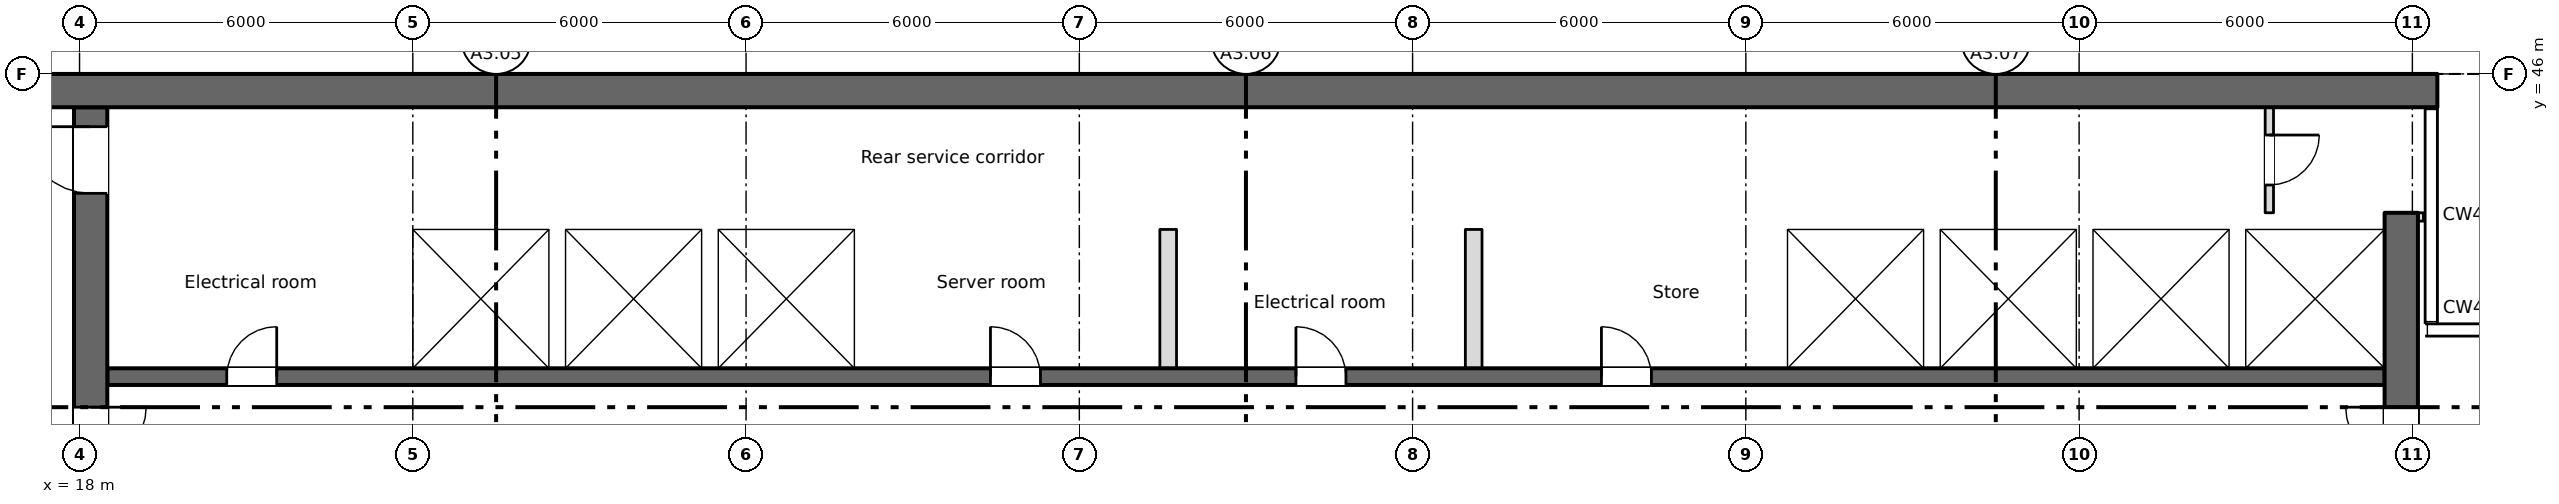
"""IFC4 building model, lengths in metres.
Left out: names, types, materials, properties, quantities, classifications, styles, units other than length and angle.
Written with IfcOpenShell. Run it as: python <this file> out.ifc"""

import sys

from ifc_helpers import new_model, si_unit, direction, frame, frame_2d, origin, place, context, subcontext, project, spatial, rectangle, extrude, element, fill, save


model = new_model("IFC4")
c1 = context("Model", 3, precision=1e-05, world=origin(), true_north=direction((0.0, 1.0)))
c2 = subcontext(c1, "Body", "Model", "MODEL_VIEW")
j1 = project(units=[si_unit("LENGTHUNIT", "METRE"), si_unit("PLANEANGLEUNIT", "RADIAN")], contexts=[c1])
p1 = place(None, origin())
s1 = spatial("IfcSite", under=j1, at=p1, CompositionType="ELEMENT")
p2 = place(p1, origin())
s2 = spatial("IfcBuilding", under=s1, at=p2, CompositionType="ELEMENT")
p3 = place(p2, frame((0.0, 0.0, 262.15)))
s3 = spatial("IfcBuildingStorey", under=s2, at=p3, CompositionType="ELEMENT", Elevation=262.15)
p4 = place(p3, frame((11.55, 45.7, 0.0), z_axis=(0.0, 0.0, 1.0), x_axis=(1.0, 0.0, 0.0)))
e1 = element("IfcWall", 1, at=p4, inside=s3, PredefinedType="SHEAR", context=c2, shape_type="SweptSolid", body=[
    extrude(rectangle(XDim=48.9, YDim=0.6, at=frame_2d((24.45, 0.0))), origin(), (0.0, 0.0, 1.0), 3.2),
])
p5 = place(p4, frame((1.2, 0.0, 0.6)))
e2 = element("IfcOpeningElement", 2, at=p5, cuts=e1, PredefinedType="OPENING", context=c2, shape_type="SweptSolid", body=[
    extrude(rectangle(XDim=0.6, YDim=2.4, at=frame_2d((0.3, 1.2))), frame((0.0, 0.31, 0.0), z_axis=(0.0, -1.0, 0.0), x_axis=(1.0, 0.0, 0.0)), (0.0, 0.0, 1.0), 0.62),
])
p6 = place(p3, frame((18.2, 28.4, 0.0), z_axis=(0.0, 0.0, 1.0), x_axis=(0.0, 1.0, 0.0)))
e3 = element("IfcWall", 3, at=p6, inside=s3, PredefinedType="SHEAR", context=c2, shape_type="SweptSolid", body=[
    extrude(rectangle(XDim=17.0, YDim=0.6, at=frame_2d((8.5, 0.0))), origin(), (0.0, 0.0, 1.0), 3.2),
])
p7 = place(p6, frame((9.6, 0.0, 0.0)))
e4 = element("IfcOpeningElement", 4, at=p7, cuts=e3, PredefinedType="OPENING", context=c2, shape_type="SweptSolid", body=[
    extrude(rectangle(XDim=2.0, YDim=2.1, at=frame_2d((1.0, 1.05))), frame((0.0, 0.31, 0.0), z_axis=(0.0, -1.0, 0.0), x_axis=(1.0, 0.0, 0.0)), (0.0, 0.0, 1.0), 0.62),
])
p8 = place(p6, frame((15.45, 0.0, 0.0)))
e5 = element("IfcOpeningElement", 5, at=p8, cuts=e3, PredefinedType="OPENING", context=c2, shape_type="SweptSolid", body=[
    extrude(rectangle(XDim=1.2, YDim=2.1, at=frame_2d((0.6, 1.05))), frame((0.0, 0.31, 0.0), z_axis=(0.0, -1.0, 0.0), x_axis=(1.0, 0.0, 0.0)), (0.0, 0.0, 1.0), 0.62),
])
p9 = place(p3, frame((59.8, 28.4, 0.0), z_axis=(0.0, 0.0, 1.0), x_axis=(0.0, 1.0, 0.0)))
e6 = element("IfcWall", 6, at=p9, inside=s3, PredefinedType="SHEAR", context=c2, shape_type="SweptSolid", body=[
    extrude(rectangle(XDim=15.1, YDim=0.6, at=frame_2d((7.55, 0.0))), origin(), (0.0, 0.0, 1.0), 3.2),
])
p10 = place(p9, frame((9.6, 0.0, 0.0)))
e7 = element("IfcOpeningElement", 7, at=p10, cuts=e6, PredefinedType="OPENING", context=c2, shape_type="SweptSolid", body=[
    extrude(rectangle(XDim=2.0, YDim=2.1, at=frame_2d((1.0, 1.05))), frame((0.0, 0.31, 0.0), z_axis=(0.0, -1.0, 0.0), x_axis=(1.0, 0.0, 0.0)), (0.0, 0.0, 1.0), 0.62),
])
p11 = place(p3, frame((18.5, 40.55, 0.0), z_axis=(0.0, 0.0, 1.0), x_axis=(1.0, 0.0, 0.0)))
e8 = element("IfcWall", 8, at=p11, inside=s3, PredefinedType="SHEAR", context=c2, shape_type="SweptSolid", body=[
    extrude(rectangle(XDim=41.0, YDim=0.3, at=frame_2d((20.5, 0.0))), origin(), (0.0, 0.0, 1.0), 3.2),
])
p12 = place(p11, frame((2.15, 0.0, 0.0)))
e9 = element("IfcOpeningElement", 9, at=p12, cuts=e8, PredefinedType="OPENING", context=c2, shape_type="SweptSolid", body=[
    extrude(rectangle(XDim=0.9, YDim=2.1, at=frame_2d((0.45, 1.05))), frame((0.0, 0.16, 0.0), z_axis=(0.0, -1.0, 0.0), x_axis=(1.0, 0.0, 0.0)), (0.0, 0.0, 1.0), 0.32),
])
p13 = place(p11, frame((15.9, 0.0, 0.0)))
e10 = element("IfcOpeningElement", 10, at=p13, cuts=e8, PredefinedType="OPENING", context=c2, shape_type="SweptSolid", body=[
    extrude(rectangle(XDim=0.9, YDim=2.1, at=frame_2d((0.45, 1.05))), frame((0.0, 0.16, 0.0), z_axis=(0.0, -1.0, 0.0), x_axis=(1.0, 0.0, 0.0)), (0.0, 0.0, 1.0), 0.32),
])
p14 = place(p11, frame((21.4, 0.0, 0.0)))
e11 = element("IfcOpeningElement", 11, at=p14, cuts=e8, PredefinedType="OPENING", context=c2, shape_type="SweptSolid", body=[
    extrude(rectangle(XDim=0.9, YDim=2.1, at=frame_2d((0.45, 1.05))), frame((0.0, 0.16, 0.0), z_axis=(0.0, -1.0, 0.0), x_axis=(1.0, 0.0, 0.0)), (0.0, 0.0, 1.0), 0.32),
])
p15 = place(p11, frame((26.9, 0.0, 0.0)))
e12 = element("IfcOpeningElement", 12, at=p15, cuts=e8, PredefinedType="OPENING", context=c2, shape_type="SweptSolid", body=[
    extrude(rectangle(XDim=0.9, YDim=2.1, at=frame_2d((0.45, 1.05))), frame((0.0, 0.16, 0.0), z_axis=(0.0, -1.0, 0.0), x_axis=(1.0, 0.0, 0.0)), (0.0, 0.0, 1.0), 0.32),
])
p16 = place(p11, frame((6.175, 0.0, 0.0)))
e13 = element("IfcOpeningElement", 13, at=p16, cuts=e8, PredefinedType="OPENING", context=c2, shape_type="SweptSolid", body=[
    extrude(rectangle(XDim=1.1, YDim=2.1, at=frame_2d((0.55, 1.05))), frame((0.0, 0.16, 0.0), z_axis=(0.0, -1.0, 0.0), x_axis=(1.0, 0.0, 0.0)), (0.0, 0.0, 1.0), 0.32),
])
p17 = place(p11, frame((8.925, 0.0, 0.0)))
e14 = element("IfcOpeningElement", 14, at=p17, cuts=e8, PredefinedType="OPENING", context=c2, shape_type="SweptSolid", body=[
    extrude(rectangle(XDim=1.1, YDim=2.1, at=frame_2d((0.55, 1.05))), frame((0.0, 0.16, 0.0), z_axis=(0.0, -1.0, 0.0), x_axis=(1.0, 0.0, 0.0)), (0.0, 0.0, 1.0), 0.32),
])
p18 = place(p11, frame((11.675, 0.0, 0.0)))
e15 = element("IfcOpeningElement", 15, at=p18, cuts=e8, PredefinedType="OPENING", context=c2, shape_type="SweptSolid", body=[
    extrude(rectangle(XDim=1.1, YDim=2.1, at=frame_2d((0.55, 1.05))), frame((0.0, 0.16, 0.0), z_axis=(0.0, -1.0, 0.0), x_axis=(1.0, 0.0, 0.0)), (0.0, 0.0, 1.0), 0.32),
])
p19 = place(p11, frame((30.925, 0.0, 0.0)))
e16 = element("IfcOpeningElement", 16, at=p19, cuts=e8, PredefinedType="OPENING", context=c2, shape_type="SweptSolid", body=[
    extrude(rectangle(XDim=1.1, YDim=2.1, at=frame_2d((0.55, 1.05))), frame((0.0, 0.16, 0.0), z_axis=(0.0, -1.0, 0.0), x_axis=(1.0, 0.0, 0.0)), (0.0, 0.0, 1.0), 0.32),
])
p20 = place(p11, frame((33.675, 0.0, 0.0)))
e17 = element("IfcOpeningElement", 17, at=p20, cuts=e8, PredefinedType="OPENING", context=c2, shape_type="SweptSolid", body=[
    extrude(rectangle(XDim=1.1, YDim=2.1, at=frame_2d((0.55, 1.05))), frame((0.0, 0.16, 0.0), z_axis=(0.0, -1.0, 0.0), x_axis=(1.0, 0.0, 0.0)), (0.0, 0.0, 1.0), 0.32),
])
p21 = place(p11, frame((36.375, 0.0, 0.0)))
e18 = element("IfcOpeningElement", 18, at=p21, cuts=e8, PredefinedType="OPENING", context=c2, shape_type="SweptSolid", body=[
    extrude(rectangle(XDim=1.2, YDim=2.1, at=frame_2d((0.6, 1.05))), frame((0.0, 0.16, 0.0), z_axis=(0.0, -1.0, 0.0), x_axis=(1.0, 0.0, 0.0)), (0.0, 0.0, 1.0), 0.32),
])
p22 = place(p11, frame((39.15, 0.0, 0.0)))
e19 = element("IfcOpeningElement", 19, at=p22, cuts=e8, PredefinedType="OPENING", context=c2, shape_type="SweptSolid", body=[
    extrude(rectangle(XDim=1.2, YDim=2.1, at=frame_2d((0.6, 1.05))), frame((0.0, 0.16, 0.0), z_axis=(0.0, -1.0, 0.0), x_axis=(1.0, 0.0, 0.0)), (0.0, 0.0, 1.0), 0.32),
])
p23 = place(p3, frame((18.5, 43.35, 0.0), z_axis=(0.0, 0.0, 1.0), x_axis=(1.0, 0.0, 0.0)))
e20 = element("IfcWall", 20, at=p23, inside=s3, PredefinedType="SHEAR", context=c2, shape_type="SweptSolid", body=[
    extrude(rectangle(XDim=41.0, YDim=0.3, at=frame_2d((20.5, 0.0))), origin(), (0.0, 0.0, 1.0), 3.2),
])
for number, where, z_axis, x_axis in (
    (21, (23.85, 40.7, 0.0), (0.0, 0.0, 1.0), (0.0, 1.0, 0.0)),
    (22, (26.6, 40.7, 0.0), (0.0, 0.0, 1.0), (0.0, 1.0, 0.0)),
    (23, (29.35, 40.7, 0.0), (0.0, 0.0, 1.0), (0.0, 1.0, 0.0)),
    (24, (32.1, 40.7, 0.0), (0.0, 0.0, 1.0), (0.0, 1.0, 0.0)),
    (25, (48.6, 40.7, 0.0), (0.0, 0.0, 1.0), (0.0, 1.0, 0.0)),
    (26, (51.35, 40.7, 0.0), (0.0, 0.0, 1.0), (0.0, 1.0, 0.0)),
    (27, (54.1, 40.7, 0.0), (0.0, 0.0, 1.0), (0.0, 1.0, 0.0)),
    (28, (56.85, 40.7, 0.0), (0.0, 0.0, 1.0), (0.0, 1.0, 0.0)),
):
    element("IfcWall", number, at=place(p3, frame(where, z_axis=z_axis, x_axis=x_axis)), inside=s3, PredefinedType="SHEAR", context=c2, shape_type="SweptSolid", body=[
        extrude(rectangle(XDim=2.5, YDim=0.3, at=frame_2d((1.25, 0.0))), origin(), (0.0, 0.0, 1.0), 3.2),
    ])
p24 = place(p3, frame((57.425, 45.4, 0.0), z_axis=(0.0, 0.0, 1.0), x_axis=(0.0, -1.0, 0.0)))
e29 = element("IfcWall", 29, at=p24, inside=s3, PredefinedType="PARTITIONING", context=c2, shape_type="SweptSolid", body=[
    extrude(rectangle(XDim=1.9, YDim=0.15, at=frame_2d((0.95, 0.0))), origin(), (0.0, 0.0, 1.0), 3.2),
])
p25 = place(p24, frame((0.5, 0.0, 0.0)))
e30 = element("IfcOpeningElement", 30, at=p25, cuts=e29, PredefinedType="OPENING", context=c2, shape_type="SweptSolid", body=[
    extrude(rectangle(XDim=0.9, YDim=2.1, at=frame_2d((0.45, 1.05))), frame((0.0, 0.085, 0.0), z_axis=(0.0, -1.0, 0.0), x_axis=(1.0, 0.0, 0.0)), (0.0, 0.0, 1.0), 0.17),
])
p26 = place(p3, frame((60.15, 43.35, 0.0), z_axis=(0.0, 0.0, 1.0), x_axis=(0.0, 1.0, 0.0)))
e31 = element("IfcWall", 31, at=p26, inside=s3, PredefinedType="PARTITIONING", context=c2, shape_type="SweptSolid", body=[
    extrude(rectangle(XDim=0.15, YDim=0.1, at=frame_2d((0.075, 0.0))), origin(), (0.0, 0.0, 1.0), 3.2),
])
for number, where, z_axis, x_axis in (
    (32, (37.6, 40.7, 0.0), (0.0, 0.0, 1.0), (0.0, 1.0, 0.0)),
    (33, (43.1, 40.7, 0.0), (0.0, 0.0, 1.0), (0.0, 1.0, 0.0)),
):
    element("IfcWall", number, at=place(p3, frame(where, z_axis=z_axis, x_axis=x_axis)), inside=s3, PredefinedType="PARTITIONING", context=c2, shape_type="SweptSolid", body=[
        extrude(rectangle(XDim=2.5, YDim=0.3, at=frame_2d((1.25, 0.0))), origin(), (0.0, 0.0, 1.0), 3.2),
    ])
p27 = place(p25, origin())
e34 = element("IfcDoor", 34, at=p27, inside=s3, OperationType="SINGLE_SWING_LEFT", PredefinedType="DOOR", context=c2, shape_type="SweptSolid", body=[
    extrude(rectangle(XDim=0.9, YDim=2.1, at=frame_2d((0.45, 1.05))), frame((0.0, 0.025, 0.0), z_axis=(0.0, -1.0, 0.0), x_axis=(1.0, 0.0, 0.0)), (0.0, 0.0, 1.0), 0.05),
])
fill(e30, e34)
p28 = place(p12, origin())
e35 = element("IfcDoor", 35, at=p28, inside=s3, OperationType="SINGLE_SWING_RIGHT", PredefinedType="DOOR", context=c2, shape_type="SweptSolid", body=[
    extrude(rectangle(XDim=0.9, YDim=2.1, at=frame_2d((0.45, 1.05))), frame((0.0, 0.025, 0.0), z_axis=(0.0, -1.0, 0.0), x_axis=(1.0, 0.0, 0.0)), (0.0, 0.0, 1.0), 0.05),
])
fill(e9, e35)
p29 = place(p13, origin())
e36 = element("IfcDoor", 36, at=p29, inside=s3, OperationType="SINGLE_SWING_LEFT", PredefinedType="DOOR", context=c2, shape_type="SweptSolid", body=[
    extrude(rectangle(XDim=0.9, YDim=2.1, at=frame_2d((0.45, 1.05))), frame((0.0, 0.025, 0.0), z_axis=(0.0, -1.0, 0.0), x_axis=(1.0, 0.0, 0.0)), (0.0, 0.0, 1.0), 0.05),
])
fill(e10, e36)
p30 = place(p14, origin())
e37 = element("IfcDoor", 37, at=p30, inside=s3, OperationType="SINGLE_SWING_LEFT", PredefinedType="DOOR", context=c2, shape_type="SweptSolid", body=[
    extrude(rectangle(XDim=0.9, YDim=2.1, at=frame_2d((0.45, 1.05))), frame((0.0, 0.025, 0.0), z_axis=(0.0, -1.0, 0.0), x_axis=(1.0, 0.0, 0.0)), (0.0, 0.0, 1.0), 0.05),
])
fill(e11, e37)
p31 = place(p15, origin())
e38 = element("IfcDoor", 38, at=p31, inside=s3, OperationType="SINGLE_SWING_LEFT", PredefinedType="DOOR", context=c2, shape_type="SweptSolid", body=[
    extrude(rectangle(XDim=0.9, YDim=2.1, at=frame_2d((0.45, 1.05))), frame((0.0, 0.025, 0.0), z_axis=(0.0, -1.0, 0.0), x_axis=(1.0, 0.0, 0.0)), (0.0, 0.0, 1.0), 0.05),
])
fill(e12, e38)
p32 = place(p16, origin())
e39 = element("IfcDoor", 39, at=p32, inside=s3, OperationType="SLIDING_TO_LEFT", PredefinedType="DOOR", context=c2, shape_type="SweptSolid", body=[
    extrude(rectangle(XDim=1.1, YDim=2.1, at=frame_2d((0.55, 1.05))), frame((0.0, 0.025, 0.0), z_axis=(0.0, -1.0, 0.0), x_axis=(1.0, 0.0, 0.0)), (0.0, 0.0, 1.0), 0.05),
])
fill(e13, e39)
p33 = place(p17, origin())
e40 = element("IfcDoor", 40, at=p33, inside=s3, OperationType="SLIDING_TO_LEFT", PredefinedType="DOOR", context=c2, shape_type="SweptSolid", body=[
    extrude(rectangle(XDim=1.1, YDim=2.1, at=frame_2d((0.55, 1.05))), frame((0.0, 0.025, 0.0), z_axis=(0.0, -1.0, 0.0), x_axis=(1.0, 0.0, 0.0)), (0.0, 0.0, 1.0), 0.05),
])
fill(e14, e40)
p34 = place(p18, origin())
e41 = element("IfcDoor", 41, at=p34, inside=s3, OperationType="SLIDING_TO_LEFT", PredefinedType="DOOR", context=c2, shape_type="SweptSolid", body=[
    extrude(rectangle(XDim=1.1, YDim=2.1, at=frame_2d((0.55, 1.05))), frame((0.0, 0.025, 0.0), z_axis=(0.0, -1.0, 0.0), x_axis=(1.0, 0.0, 0.0)), (0.0, 0.0, 1.0), 0.05),
])
fill(e15, e41)
p35 = place(p19, origin())
e42 = element("IfcDoor", 42, at=p35, inside=s3, OperationType="SLIDING_TO_LEFT", PredefinedType="DOOR", context=c2, shape_type="SweptSolid", body=[
    extrude(rectangle(XDim=1.1, YDim=2.1, at=frame_2d((0.55, 1.05))), frame((0.0, 0.025, 0.0), z_axis=(0.0, -1.0, 0.0), x_axis=(1.0, 0.0, 0.0)), (0.0, 0.0, 1.0), 0.05),
])
fill(e16, e42)
p36 = place(p20, origin())
e43 = element("IfcDoor", 43, at=p36, inside=s3, OperationType="SLIDING_TO_LEFT", PredefinedType="DOOR", context=c2, shape_type="SweptSolid", body=[
    extrude(rectangle(XDim=1.1, YDim=2.1, at=frame_2d((0.55, 1.05))), frame((0.0, 0.025, 0.0), z_axis=(0.0, -1.0, 0.0), x_axis=(1.0, 0.0, 0.0)), (0.0, 0.0, 1.0), 0.05),
])
fill(e17, e43)
p37 = place(p21, origin())
e44 = element("IfcDoor", 44, at=p37, inside=s3, OperationType="SLIDING_TO_LEFT", PredefinedType="DOOR", context=c2, shape_type="SweptSolid", body=[
    extrude(rectangle(XDim=1.2, YDim=2.1, at=frame_2d((0.6, 1.05))), frame((0.0, 0.025, 0.0), z_axis=(0.0, -1.0, 0.0), x_axis=(1.0, 0.0, 0.0)), (0.0, 0.0, 1.0), 0.05),
])
fill(e18, e44)
p38 = place(p22, origin())
e45 = element("IfcDoor", 45, at=p38, inside=s3, OperationType="SLIDING_TO_LEFT", PredefinedType="DOOR", context=c2, shape_type="SweptSolid", body=[
    extrude(rectangle(XDim=1.2, YDim=2.1, at=frame_2d((0.6, 1.05))), frame((0.0, 0.025, 0.0), z_axis=(0.0, -1.0, 0.0), x_axis=(1.0, 0.0, 0.0)), (0.0, 0.0, 1.0), 0.05),
])
fill(e19, e45)
p39 = place(p7, origin())
e46 = element("IfcDoor", 46, at=p39, inside=s3, OperationType="DOUBLE_DOOR_SINGLE_SWING", PredefinedType="DOOR", context=c2, shape_type="SweptSolid", body=[
    extrude(rectangle(XDim=2.0, YDim=2.1, at=frame_2d((1.0, 1.05))), frame((0.0, 0.025, 0.0), z_axis=(0.0, -1.0, 0.0), x_axis=(1.0, 0.0, 0.0)), (0.0, 0.0, 1.0), 0.05),
])
fill(e4, e46)
p40 = place(p10, origin())
e47 = element("IfcDoor", 47, at=p40, inside=s3, OperationType="DOUBLE_DOOR_SINGLE_SWING", PredefinedType="DOOR", context=c2, shape_type="SweptSolid", body=[
    extrude(rectangle(XDim=2.0, YDim=2.1, at=frame_2d((1.0, 1.05))), frame((0.0, 0.025, 0.0), z_axis=(0.0, -1.0, 0.0), x_axis=(1.0, 0.0, 0.0)), (0.0, 0.0, 1.0), 0.05),
])
fill(e7, e47)
p41 = place(p8, origin())
e48 = element("IfcDoor", 48, at=p41, inside=s3, OperationType="SINGLE_SWING_RIGHT", PredefinedType="DOOR", context=c2, shape_type="SweptSolid", body=[
    extrude(rectangle(XDim=1.2, YDim=2.1, at=frame_2d((0.6, 1.05))), frame((0.0, 0.025, 0.0), z_axis=(0.0, -1.0, 0.0), x_axis=(1.0, 0.0, 0.0)), (0.0, 0.0, 1.0), 0.05),
])
fill(e5, e48)
save(model, sys.argv[1])
